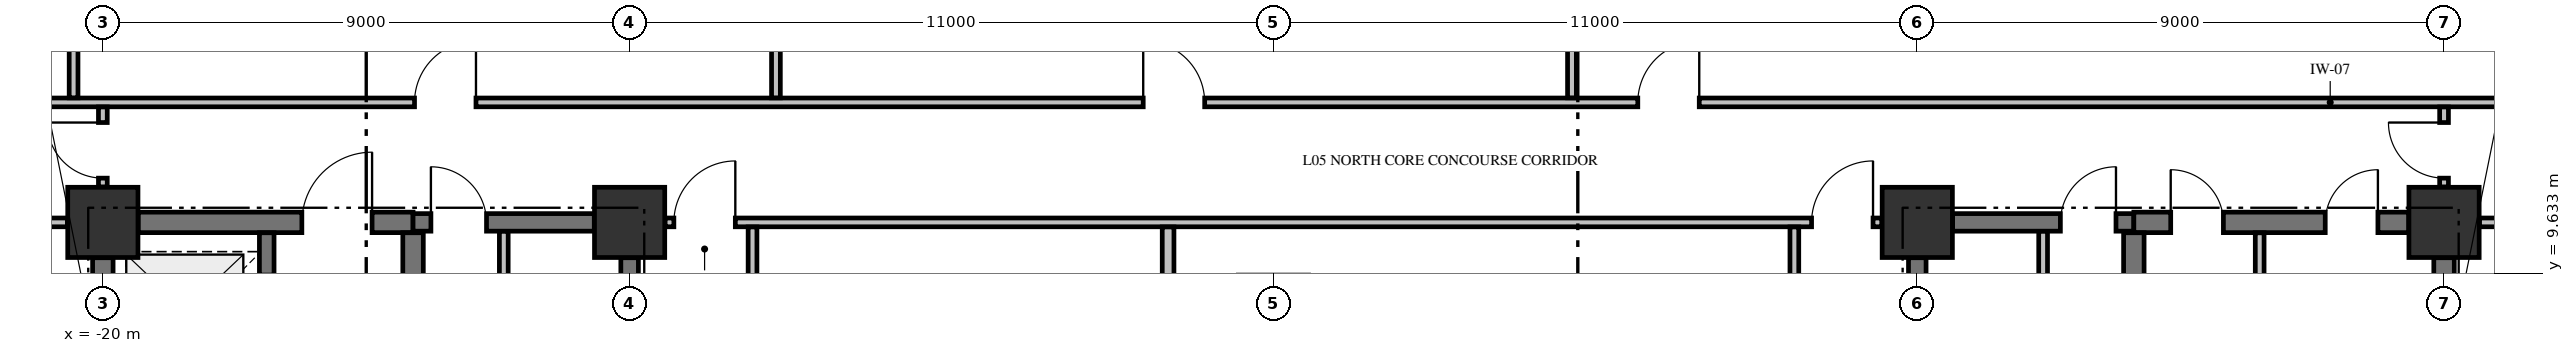
"""IFC4 building model, lengths in metres.
Left out: names, types, materials, properties, quantities, classifications, styles, units other than length and angle.
Written with IfcOpenShell. Run it as: python <this file> out.ifc"""

import sys

from ifc_helpers import new_model, si_unit, direction, frame, frame_2d, origin, origin_2d, place, context, subcontext, project, spatial, rectangle, extrude, element, fill, save


model = new_model("IFC4")
c1 = context("Model", 3, precision=1e-05, world=origin(), true_north=direction((0.0, 1.0)))
c2 = subcontext(c1, "Body", "Model", "MODEL_VIEW")
j1 = project(units=[si_unit("LENGTHUNIT", "METRE"), si_unit("PLANEANGLEUNIT", "RADIAN")], contexts=[c1])
p1 = place(None, origin())
s1 = spatial("IfcSite", under=j1, at=p1, CompositionType="ELEMENT")
p2 = place(p1, origin())
s2 = spatial("IfcBuilding", under=s1, at=p2, CompositionType="ELEMENT")
p3 = place(p2, frame((0.0, 0.0, 27.2)))
s3 = spatial("IfcBuildingStorey", under=s2, at=p3, CompositionType="ELEMENT", Elevation=27.2)
for number, where, z_axis, x_axis in (
    (1, (-20.0, 10.5, -0.45), (0.0, 0.0, 1.0), (1.0, 0.0, 0.0)),
    (2, (-11.0, 10.5, -0.45), (0.0, 0.0, 1.0), (1.0, 0.0, 0.0)),
    (3, (11.0, 10.5, -0.45), (0.0, 0.0, 1.0), (1.0, 0.0, 0.0)),
    (4, (20.0, 10.5, -0.45), (0.0, 0.0, 1.0), (1.0, 0.0, 0.0)),
):
    element("IfcColumn", number, at=place(p3, frame(where, z_axis=z_axis, x_axis=x_axis)), inside=s3, PredefinedType="COLUMN", context=c2, shape_type="SweptSolid", body=[
        extrude(rectangle(XDim=1.2, YDim=1.2, at=origin_2d()), origin(), (0.0, 0.0, 1.0), 3.77),
    ])
p4 = place(p3, frame((-19.396, 10.5, 0.0), z_axis=(0.0, 0.0, 1.0), x_axis=(1.0, 0.0, 0.0)))
e5 = element("IfcWall", 5, at=p4, inside=s3, PredefinedType="SHEAR", context=c2, shape_type="SweptSolid", body=[
    extrude(rectangle(XDim=4.696, YDim=0.35, at=frame_2d((2.348, 0.0))), origin(), (0.0, 0.0, 1.0), 3.32),
])
p5 = place(p4, frame((2.796, 0.0, 0.0)))
e6 = element("IfcOpeningElement", 6, at=p5, cuts=e5, PredefinedType="OPENING", context=c2, shape_type="SweptSolid", body=[
    extrude(rectangle(XDim=1.2, YDim=2.15, at=frame_2d((0.6, 1.075))), frame((0.0, 0.185, 0.0), z_axis=(0.0, -1.0, 0.0), x_axis=(1.0, 0.0, 0.0)), (0.0, 0.0, 1.0), 0.37),
])
p6 = place(p3, frame((-14.7, 10.5, 0.0), z_axis=(0.0, 0.0, 1.0), x_axis=(1.0, 0.0, 0.0)))
e7 = element("IfcWall", 7, at=p6, inside=s3, PredefinedType="SHEAR", context=c2, shape_type="SweptSolid", body=[
    extrude(rectangle(XDim=3.096, YDim=0.3, at=frame_2d((1.548, 0.0))), origin(), (0.0, 0.0, 1.0), 3.32),
])
p7 = place(p6, frame((0.305, 0.0, 0.0)))
e8 = element("IfcOpeningElement", 8, at=p7, cuts=e7, PredefinedType="OPENING", context=c2, shape_type="SweptSolid", body=[
    extrude(rectangle(XDim=0.95, YDim=2.15, at=frame_2d((0.475, 1.075))), frame((0.0, 0.16, 0.0), z_axis=(0.0, -1.0, 0.0), x_axis=(1.0, 0.0, 0.0)), (0.0, 0.0, 1.0), 0.32),
])
p8 = place(p3, frame((11.604, 10.5, 0.0), z_axis=(0.0, 0.0, 1.0), x_axis=(1.0, 0.0, 0.0)))
e9 = element("IfcWall", 9, at=p8, inside=s3, PredefinedType="SHEAR", context=c2, shape_type="SweptSolid", body=[
    extrude(rectangle(XDim=3.096, YDim=0.3, at=frame_2d((1.548, 0.0))), origin(), (0.0, 0.0, 1.0), 3.32),
])
p9 = place(p8, frame((1.841, 0.0, 0.0)))
e10 = element("IfcOpeningElement", 10, at=p9, cuts=e9, PredefinedType="OPENING", context=c2, shape_type="SweptSolid", body=[
    extrude(rectangle(XDim=0.95, YDim=2.15, at=frame_2d((0.475, 1.075))), frame((0.0, 0.16, 0.0), z_axis=(0.0, -1.0, 0.0), x_axis=(1.0, 0.0, 0.0)), (0.0, 0.0, 1.0), 0.32),
])
p10 = place(p3, frame((14.7, 10.5, 0.0), z_axis=(0.0, 0.0, 1.0), x_axis=(1.0, 0.0, 0.0)))
e11 = element("IfcWall", 11, at=p10, inside=s3, PredefinedType="SHEAR", context=c2, shape_type="SweptSolid", body=[
    extrude(rectangle(XDim=4.696, YDim=0.35, at=frame_2d((2.348, 0.0))), origin(), (0.0, 0.0, 1.0), 3.32),
])
p11 = place(p10, frame((0.63, 0.0, 0.0)))
e12 = element("IfcOpeningElement", 12, at=p11, cuts=e11, PredefinedType="OPENING", context=c2, shape_type="SweptSolid", body=[
    extrude(rectangle(XDim=0.9, YDim=2.15, at=frame_2d((0.45, 1.075))), frame((0.0, 0.185, 0.0), z_axis=(0.0, -1.0, 0.0), x_axis=(1.0, 0.0, 0.0)), (0.0, 0.0, 1.0), 0.37),
])
p12 = place(p10, frame((3.27, 0.0, 0.0)))
e13 = element("IfcOpeningElement", 13, at=p12, cuts=e11, PredefinedType="OPENING", context=c2, shape_type="SweptSolid", body=[
    extrude(rectangle(XDim=0.9, YDim=2.15, at=frame_2d((0.45, 1.075))), frame((0.0, 0.185, 0.0), z_axis=(0.0, -1.0, 0.0), x_axis=(1.0, 0.0, 0.0)), (0.0, 0.0, 1.0), 0.37),
])
p13 = place(p3, frame((-23.835, 10.5, 0.0), z_axis=(0.0, 0.0, 1.0), x_axis=(1.0, 0.0, 0.0)))
e14 = element("IfcWall", 14, at=p13, inside=s3, PredefinedType="PARTITIONING", context=c2, shape_type="SweptSolid", body=[
    extrude(rectangle(XDim=3.229, YDim=0.15, at=frame_2d((1.615, 0.0))), origin(), (0.0, 0.0, 1.0), 3.32),
])
p14 = place(p13, frame((1.36, 0.0, 0.0)))
e15 = element("IfcOpeningElement", 15, at=p14, cuts=e14, PredefinedType="OPENING", context=c2, shape_type="SweptSolid", body=[
    extrude(rectangle(XDim=0.95, YDim=2.15, at=frame_2d((0.475, 1.075))), frame((0.0, 0.085, 0.0), z_axis=(0.0, -1.0, 0.0), x_axis=(1.0, 0.0, 0.0)), (0.0, 0.0, 1.0), 0.17),
])
p15 = place(p3, frame((-10.394, 10.5, 0.0), z_axis=(0.0, 0.0, 1.0), x_axis=(1.0, 0.0, 0.0)))
e16 = element("IfcWall", 16, at=p15, inside=s3, PredefinedType="PARTITIONING", context=c2, shape_type="SweptSolid", body=[
    extrude(rectangle(XDim=20.788, YDim=0.15, at=frame_2d((10.394, 0.0))), origin(), (0.0, 0.0, 1.0), 3.32),
])
p16 = place(p15, frame((0.15, 0.0, 0.0)))
e17 = element("IfcOpeningElement", 17, at=p16, cuts=e16, PredefinedType="OPENING", context=c2, shape_type="SweptSolid", body=[
    extrude(rectangle(XDim=1.05, YDim=2.15, at=frame_2d((0.525, 1.075))), frame((0.0, 0.085, 0.0), z_axis=(0.0, -1.0, 0.0), x_axis=(1.0, 0.0, 0.0)), (0.0, 0.0, 1.0), 0.17),
])
p17 = place(p15, frame((19.588, 0.0, 0.0)))
e18 = element("IfcOpeningElement", 18, at=p17, cuts=e16, PredefinedType="OPENING", context=c2, shape_type="SweptSolid", body=[
    extrude(rectangle(XDim=1.05, YDim=2.15, at=frame_2d((0.525, 1.075))), frame((0.0, 0.085, 0.0), z_axis=(0.0, -1.0, 0.0), x_axis=(1.0, 0.0, 0.0)), (0.0, 0.0, 1.0), 0.17),
])
p18 = place(p3, frame((20.606, 10.5, 0.0), z_axis=(0.0, 0.0, 1.0), x_axis=(1.0, 0.0, 0.0)))
e19 = element("IfcWall", 19, at=p18, inside=s3, PredefinedType="PARTITIONING", context=c2, shape_type="SweptSolid", body=[
    extrude(rectangle(XDim=8.229, YDim=0.15, at=frame_2d((4.115, 0.0))), origin(), (0.0, 0.0, 1.0), 3.32),
])
p19 = place(p18, frame((3.394, 0.0, 0.0)))
e20 = element("IfcOpeningElement", 20, at=p19, cuts=e19, PredefinedType="OPENING", context=c2, shape_type="SweptSolid", body=[
    extrude(rectangle(XDim=1.0, YDim=2.15, at=frame_2d((0.5, 1.075))), frame((0.0, 0.085, 0.0), z_axis=(0.0, -1.0, 0.0), x_axis=(1.0, 0.0, 0.0)), (0.0, 0.0, 1.0), 0.17),
])
p20 = place(p3, frame((-23.835, 12.55, 0.0), z_axis=(0.0, 0.0, 1.0), x_axis=(1.0, 0.0, 0.0)))
e21 = element("IfcWall", 21, at=p20, inside=s3, PredefinedType="PARTITIONING", context=c2, shape_type="SweptSolid", body=[
    extrude(rectangle(XDim=52.67, YDim=0.15, at=frame_2d((26.335, 0.0))), origin(), (0.0, 0.0, 1.0), 3.32),
])
p21 = place(p20, frame((9.16, 0.0, 0.0)))
e22 = element("IfcOpeningElement", 22, at=p21, cuts=e21, PredefinedType="OPENING", context=c2, shape_type="SweptSolid", body=[
    extrude(rectangle(XDim=1.05, YDim=2.15, at=frame_2d((0.525, 1.075))), frame((0.0, 0.085, 0.0), z_axis=(0.0, -1.0, 0.0), x_axis=(1.0, 0.0, 0.0)), (0.0, 0.0, 1.0), 0.17),
])
p22 = place(p20, frame((21.61, 0.0, 0.0)))
e23 = element("IfcOpeningElement", 23, at=p22, cuts=e21, PredefinedType="OPENING", context=c2, shape_type="SweptSolid", body=[
    extrude(rectangle(XDim=1.05, YDim=2.15, at=frame_2d((0.525, 1.075))), frame((0.0, 0.085, 0.0), z_axis=(0.0, -1.0, 0.0), x_axis=(1.0, 0.0, 0.0)), (0.0, 0.0, 1.0), 0.17),
])
p23 = place(p20, frame((30.06, 0.0, 0.0)))
e24 = element("IfcOpeningElement", 24, at=p23, cuts=e21, PredefinedType="OPENING", context=c2, shape_type="SweptSolid", body=[
    extrude(rectangle(XDim=1.05, YDim=2.15, at=frame_2d((0.525, 1.075))), frame((0.0, 0.085, 0.0), z_axis=(0.0, -1.0, 0.0), x_axis=(1.0, 0.0, 0.0)), (0.0, 0.0, 1.0), 0.17),
])
p24 = place(p3, frame((-20.0, 7.727, 0.0), z_axis=(0.0, 0.0, 1.0), x_axis=(0.0, 1.0, 0.0)))
e25 = element("IfcWall", 25, at=p24, inside=s3, PredefinedType="SHEAR", context=c2, shape_type="SweptSolid", body=[
    extrude(rectangle(XDim=2.169, YDim=0.35, at=frame_2d((1.084, 0.0))), origin(), (0.0, 0.0, 1.0), 3.32),
])
p25 = place(p3, frame((-17.2, 7.727, 0.0), z_axis=(0.0, 0.0, 1.0), x_axis=(0.0, 1.0, 0.0)))
e26 = element("IfcWall", 26, at=p25, inside=s3, PredefinedType="SOLIDWALL", context=c2, shape_type="SweptSolid", body=[
    extrude(rectangle(XDim=2.596, YDim=0.25, at=frame_2d((1.298, 0.0))), origin(), (0.0, 0.0, 1.0), 3.32),
])
p26 = place(p25, frame((0.773, 0.0, 0.0)))
e27 = element("IfcOpeningElement", 27, at=p26, cuts=e26, PredefinedType="OPENING", context=c2, shape_type="SweptSolid", body=[
    extrude(rectangle(XDim=1.1, YDim=2.2, at=frame_2d((0.55, 1.1))), frame((0.0, 0.135, 0.0), z_axis=(0.0, -1.0, 0.0), x_axis=(1.0, 0.0, 0.0)), (0.0, 0.0, 1.0), 0.27),
])
p27 = place(p3, frame((-14.7, 5.852, 0.0), z_axis=(0.0, 0.0, 1.0), x_axis=(0.0, 1.0, 0.0)))
e28 = element("IfcWall", 28, at=p27, inside=s3, PredefinedType="SHEAR", context=c2, shape_type="SweptSolid", body=[
    extrude(rectangle(XDim=4.471, YDim=0.35, at=frame_2d((2.235, 0.0))), origin(), (0.0, 0.0, 1.0), 3.32),
])
for number, where, z_axis, x_axis in (
    (29, (-11.0, 5.852, 0.0), (0.0, 0.0, 1.0), (0.0, 1.0, 0.0)),
    (30, (11.0, 5.852, 0.0), (0.0, 0.0, 1.0), (0.0, 1.0, 0.0)),
):
    element("IfcWall", number, at=place(p3, frame(where, z_axis=z_axis, x_axis=x_axis)), inside=s3, PredefinedType="SHEAR", context=c2, shape_type="SweptSolid", body=[
        extrude(rectangle(XDim=4.044, YDim=0.3, at=frame_2d((2.022, 0.0))), origin(), (0.0, 0.0, 1.0), 3.32),
    ])
p28 = place(p3, frame((14.7, 5.852, 0.0), z_axis=(0.0, 0.0, 1.0), x_axis=(0.0, 1.0, 0.0)))
e31 = element("IfcWall", 31, at=p28, inside=s3, PredefinedType="SHEAR", context=c2, shape_type="SweptSolid", body=[
    extrude(rectangle(XDim=4.471, YDim=0.35, at=frame_2d((2.235, 0.0))), origin(), (0.0, 0.0, 1.0), 3.32),
])
p29 = place(p3, frame((20.0, 0.604, 0.0), z_axis=(0.0, 0.0, 1.0), x_axis=(0.0, 1.0, 0.0)))
e32 = element("IfcWall", 32, at=p29, inside=s3, PredefinedType="SHEAR", context=c2, shape_type="SweptSolid", body=[
    extrude(rectangle(XDim=9.292, YDim=0.35, at=frame_2d((4.646, 0.0))), origin(), (0.0, 0.0, 1.0), 3.32),
])
p30 = place(p3, frame((-20.5, 12.628, 0.0), z_axis=(0.0, 0.0, 1.0), x_axis=(0.0, 1.0, 0.0)))
e33 = element("IfcWall", 33, at=p30, inside=s3, PredefinedType="PARTITIONING", context=c2, shape_type="SweptSolid", body=[
    extrude(rectangle(XDim=9.666, YDim=0.15, at=frame_2d((4.833, 0.0))), origin(), (0.0, 0.0, 1.0), 3.32),
])
p31 = place(p3, frame((-20.0, 11.106, 0.0), z_axis=(0.0, 0.0, 1.0), x_axis=(0.0, 1.0, 0.0)))
e34 = element("IfcWall", 34, at=p31, inside=s3, PredefinedType="PARTITIONING", context=c2, shape_type="SweptSolid", body=[
    extrude(rectangle(XDim=1.366, YDim=0.15, at=frame_2d((0.683, 0.0))), origin(), (0.0, 0.0, 1.0), 3.32),
])
p32 = place(p31, frame((0.15, 0.0, 0.0)))
e35 = element("IfcOpeningElement", 35, at=p32, cuts=e34, PredefinedType="OPENING", context=c2, shape_type="SweptSolid", body=[
    extrude(rectangle(XDim=0.95, YDim=2.15, at=frame_2d((0.475, 1.075))), frame((0.0, 0.085, 0.0), z_axis=(0.0, -1.0, 0.0), x_axis=(1.0, 0.0, 0.0)), (0.0, 0.0, 1.0), 0.17),
])
p33 = place(p3, frame((-13.15, 7.228, 0.0), z_axis=(0.0, 0.0, 1.0), x_axis=(0.0, 1.0, 0.0)))
e36 = element("IfcWall", 36, at=p33, inside=s3, PredefinedType="PARTITIONING", context=c2, shape_type="SweptSolid", body=[
    extrude(rectangle(XDim=3.119, YDim=0.15, at=frame_2d((1.56, 0.0))), origin(), (0.0, 0.0, 1.0), 3.32),
])
p34 = place(p33, frame((1.097, 0.0, 0.0)))
e37 = element("IfcOpeningElement", 37, at=p34, cuts=e36, PredefinedType="OPENING", context=c2, shape_type="SweptSolid", body=[
    extrude(rectangle(XDim=0.95, YDim=2.15, at=frame_2d((0.475, 1.075))), frame((0.0, 0.085, 0.0), z_axis=(0.0, -1.0, 0.0), x_axis=(1.0, 0.0, 0.0)), (0.0, 0.0, 1.0), 0.17),
])
p35 = place(p3, frame((-8.9, -3.097, 0.0), z_axis=(0.0, 0.0, 1.0), x_axis=(0.0, 1.0, 0.0)))
e38 = element("IfcWall", 38, at=p35, inside=s3, PredefinedType="PARTITIONING", context=c2, shape_type="SweptSolid", body=[
    extrude(rectangle(XDim=13.519, YDim=0.15, at=frame_2d((6.76, 0.0))), origin(), (0.0, 0.0, 1.0), 3.32),
])
p36 = place(p35, frame((6.222, 0.0, 0.0)))
e39 = element("IfcOpeningElement", 39, at=p36, cuts=e38, PredefinedType="OPENING", context=c2, shape_type="SweptSolid", body=[
    extrude(rectangle(XDim=1.05, YDim=2.15, at=frame_2d((0.525, 1.075))), frame((0.0, 0.085, 0.0), z_axis=(0.0, -1.0, 0.0), x_axis=(1.0, 0.0, 0.0)), (0.0, 0.0, 1.0), 0.17),
])
p37 = place(p3, frame((-8.5, 12.628, 0.0), z_axis=(0.0, 0.0, 1.0), x_axis=(0.0, 1.0, 0.0)))
e40 = element("IfcWall", 40, at=p37, inside=s3, PredefinedType="PARTITIONING", context=c2, shape_type="SweptSolid", body=[
    extrude(rectangle(XDim=13.707, YDim=0.15, at=frame_2d((6.854, 0.0))), origin(), (0.0, 0.0, 1.0), 3.32),
])
p38 = place(p3, frame((-1.8, -1.097, 0.0), z_axis=(0.0, 0.0, 1.0), x_axis=(0.0, 1.0, 0.0)))
e41 = element("IfcWall", 41, at=p38, inside=s3, PredefinedType="PARTITIONING", context=c2, shape_type="SweptSolid", body=[
    extrude(rectangle(XDim=11.519, YDim=0.2, at=frame_2d((5.76, 0.0))), origin(), (0.0, 0.0, 1.0), 3.32),
])
p39 = place(p3, frame((5.1, 12.628, 0.0), z_axis=(0.0, 0.0, 1.0), x_axis=(0.0, 1.0, 0.0)))
e42 = element("IfcWall", 42, at=p39, inside=s3, PredefinedType="PARTITIONING", context=c2, shape_type="SweptSolid", body=[
    extrude(rectangle(XDim=13.707, YDim=0.15, at=frame_2d((6.854, 0.0))), origin(), (0.0, 0.0, 1.0), 3.32),
])
p40 = place(p3, frame((8.9, -1.097, 0.0), z_axis=(0.0, 0.0, 1.0), x_axis=(0.0, 1.0, 0.0)))
e43 = element("IfcWall", 43, at=p40, inside=s3, PredefinedType="PARTITIONING", context=c2, shape_type="SweptSolid", body=[
    extrude(rectangle(XDim=11.519, YDim=0.15, at=frame_2d((5.76, 0.0))), origin(), (0.0, 0.0, 1.0), 3.32),
])
p41 = place(p40, frame((5.197, 0.0, 0.0)))
e44 = element("IfcOpeningElement", 44, at=p41, cuts=e43, PredefinedType="OPENING", context=c2, shape_type="SweptSolid", body=[
    extrude(rectangle(XDim=1.1, YDim=2.15, at=frame_2d((0.55, 1.075))), frame((0.0, 0.085, 0.0), z_axis=(0.0, -1.0, 0.0), x_axis=(1.0, 0.0, 0.0)), (0.0, 0.0, 1.0), 0.17),
])
p42 = place(p3, frame((13.15, 7.228, 0.0), z_axis=(0.0, 0.0, 1.0), x_axis=(0.0, 1.0, 0.0)))
e45 = element("IfcWall", 45, at=p42, inside=s3, PredefinedType="PARTITIONING", context=c2, shape_type="SweptSolid", body=[
    extrude(rectangle(XDim=3.119, YDim=0.15, at=frame_2d((1.56, 0.0))), origin(), (0.0, 0.0, 1.0), 3.32),
])
p43 = place(p42, frame((1.097, 0.0, 0.0)))
e46 = element("IfcOpeningElement", 46, at=p43, cuts=e45, PredefinedType="OPENING", context=c2, shape_type="SweptSolid", body=[
    extrude(rectangle(XDim=0.95, YDim=2.15, at=frame_2d((0.475, 1.075))), frame((0.0, 0.085, 0.0), z_axis=(0.0, -1.0, 0.0), x_axis=(1.0, 0.0, 0.0)), (0.0, 0.0, 1.0), 0.17),
])
p44 = place(p3, frame((16.85, 3.078, 0.0), z_axis=(0.0, 0.0, 1.0), x_axis=(0.0, 1.0, 0.0)))
e47 = element("IfcWall", 47, at=p44, inside=s3, PredefinedType="PARTITIONING", context=c2, shape_type="SweptSolid", body=[
    extrude(rectangle(XDim=7.244, YDim=0.15, at=frame_2d((3.622, 0.0))), origin(), (0.0, 0.0, 1.0), 3.32),
])
p45 = place(p3, frame((20.0, 11.106, 0.0), z_axis=(0.0, 0.0, 1.0), x_axis=(0.0, 1.0, 0.0)))
e48 = element("IfcWall", 48, at=p45, inside=s3, PredefinedType="PARTITIONING", context=c2, shape_type="SweptSolid", body=[
    extrude(rectangle(XDim=1.366, YDim=0.15, at=frame_2d((0.683, 0.0))), origin(), (0.0, 0.0, 1.0), 2.66),
])
p46 = place(p45, frame((0.15, 0.0, 0.0)))
e49 = element("IfcOpeningElement", 49, at=p46, cuts=e48, PredefinedType="OPENING", context=c2, shape_type="SweptSolid", body=[
    extrude(rectangle(XDim=0.95, YDim=2.15, at=frame_2d((0.475, 1.075))), frame((0.0, 0.085, 0.0), z_axis=(0.0, -1.0, 0.0), x_axis=(1.0, 0.0, 0.0)), (0.0, 0.0, 1.0), 0.17),
])
p47 = place(p7, origin())
e50 = element("IfcDoor", 50, at=p47, inside=s3, OperationType="SINGLE_SWING_LEFT", PredefinedType="DOOR", context=c2, shape_type="SweptSolid", body=[
    extrude(rectangle(XDim=0.95, YDim=2.15, at=frame_2d((0.475, 1.075))), frame((0.0, 0.025, 0.0), z_axis=(0.0, -1.0, 0.0), x_axis=(1.0, 0.0, 0.0)), (0.0, 0.0, 1.0), 0.05),
])
fill(e8, e50)
p48 = place(p9, origin())
e51 = element("IfcDoor", 51, at=p48, inside=s3, OperationType="SINGLE_SWING_RIGHT", PredefinedType="DOOR", context=c2, shape_type="SweptSolid", body=[
    extrude(rectangle(XDim=0.95, YDim=2.15, at=frame_2d((0.475, 1.075))), frame((0.0, 0.025, 0.0), z_axis=(0.0, -1.0, 0.0), x_axis=(1.0, 0.0, 0.0)), (0.0, 0.0, 1.0), 0.05),
])
fill(e10, e51)
p49 = place(p5, origin())
e52 = element("IfcDoor", 52, at=p49, inside=s3, OperationType="SINGLE_SWING_RIGHT", PredefinedType="DOOR", context=c2, shape_type="SweptSolid", body=[
    extrude(rectangle(XDim=1.2, YDim=2.15, at=frame_2d((0.6, 1.075))), frame((0.0, 0.025, 0.0), z_axis=(0.0, -1.0, 0.0), x_axis=(1.0, 0.0, 0.0)), (0.0, 0.0, 1.0), 0.05),
])
fill(e6, e52)
p50 = place(p11, origin())
e53 = element("IfcDoor", 53, at=p50, inside=s3, OperationType="SINGLE_SWING_LEFT", PredefinedType="DOOR", context=c2, shape_type="SweptSolid", body=[
    extrude(rectangle(XDim=0.9, YDim=2.15, at=frame_2d((0.45, 1.075))), frame((0.0, 0.025, 0.0), z_axis=(0.0, -1.0, 0.0), x_axis=(1.0, 0.0, 0.0)), (0.0, 0.0, 1.0), 0.05),
])
fill(e12, e53)
p51 = place(p12, origin())
e54 = element("IfcDoor", 54, at=p51, inside=s3, OperationType="SINGLE_SWING_RIGHT", PredefinedType="DOOR", context=c2, shape_type="SweptSolid", body=[
    extrude(rectangle(XDim=0.9, YDim=2.15, at=frame_2d((0.45, 1.075))), frame((0.0, 0.025, 0.0), z_axis=(0.0, -1.0, 0.0), x_axis=(1.0, 0.0, 0.0)), (0.0, 0.0, 1.0), 0.05),
])
fill(e13, e54)
p52 = place(p16, origin())
e55 = element("IfcDoor", 55, at=p52, inside=s3, OperationType="SINGLE_SWING_RIGHT", PredefinedType="DOOR", context=c2, shape_type="SweptSolid", body=[
    extrude(rectangle(XDim=1.05, YDim=2.15, at=frame_2d((0.525, 1.075))), frame((0.0, 0.025, 0.0), z_axis=(0.0, -1.0, 0.0), x_axis=(1.0, 0.0, 0.0)), (0.0, 0.0, 1.0), 0.05),
])
fill(e17, e55)
p53 = place(p17, origin())
e56 = element("IfcDoor", 56, at=p53, inside=s3, OperationType="SINGLE_SWING_RIGHT", PredefinedType="DOOR", context=c2, shape_type="SweptSolid", body=[
    extrude(rectangle(XDim=1.05, YDim=2.15, at=frame_2d((0.525, 1.075))), frame((0.0, 0.025, 0.0), z_axis=(0.0, -1.0, 0.0), x_axis=(1.0, 0.0, 0.0)), (0.0, 0.0, 1.0), 0.05),
])
fill(e18, e56)
p54 = place(p21, origin())
e57 = element("IfcDoor", 57, at=p54, inside=s3, OperationType="SINGLE_SWING_RIGHT", PredefinedType="DOOR", context=c2, shape_type="SweptSolid", body=[
    extrude(rectangle(XDim=1.05, YDim=2.15, at=frame_2d((0.525, 1.075))), frame((0.0, 0.025, 0.0), z_axis=(0.0, -1.0, 0.0), x_axis=(1.0, 0.0, 0.0)), (0.0, 0.0, 1.0), 0.05),
])
fill(e22, e57)
p55 = place(p22, origin())
e58 = element("IfcDoor", 58, at=p55, inside=s3, OperationType="SINGLE_SWING_LEFT", PredefinedType="DOOR", context=c2, shape_type="SweptSolid", body=[
    extrude(rectangle(XDim=1.05, YDim=2.15, at=frame_2d((0.525, 1.075))), frame((0.0, 0.025, 0.0), z_axis=(0.0, -1.0, 0.0), x_axis=(1.0, 0.0, 0.0)), (0.0, 0.0, 1.0), 0.05),
])
fill(e23, e58)
p56 = place(p23, origin())
e59 = element("IfcDoor", 59, at=p56, inside=s3, OperationType="SINGLE_SWING_RIGHT", PredefinedType="DOOR", context=c2, shape_type="SweptSolid", body=[
    extrude(rectangle(XDim=1.05, YDim=2.15, at=frame_2d((0.525, 1.075))), frame((0.0, 0.025, 0.0), z_axis=(0.0, -1.0, 0.0), x_axis=(1.0, 0.0, 0.0)), (0.0, 0.0, 1.0), 0.05),
])
fill(e24, e59)
p57 = place(p32, origin())
e60 = element("IfcDoor", 60, at=p57, inside=s3, OperationType="SINGLE_SWING_RIGHT", PredefinedType="DOOR", context=c2, shape_type="SweptSolid", body=[
    extrude(rectangle(XDim=0.95, YDim=2.15, at=frame_2d((0.475, 1.075))), frame((0.0, 0.025, 0.0), z_axis=(0.0, -1.0, 0.0), x_axis=(1.0, 0.0, 0.0)), (0.0, 0.0, 1.0), 0.05),
])
fill(e35, e60)
p58 = place(p46, origin())
e61 = element("IfcDoor", 61, at=p58, inside=s3, OperationType="SINGLE_SWING_RIGHT", PredefinedType="DOOR", context=c2, shape_type="SweptSolid", body=[
    extrude(rectangle(XDim=0.95, YDim=2.15, at=frame_2d((0.475, 1.075))), frame((0.0, 0.025, 0.0), z_axis=(0.0, -1.0, 0.0), x_axis=(1.0, 0.0, 0.0)), (0.0, 0.0, 1.0), 0.05),
])
fill(e49, e61)
save(model, sys.argv[1])
